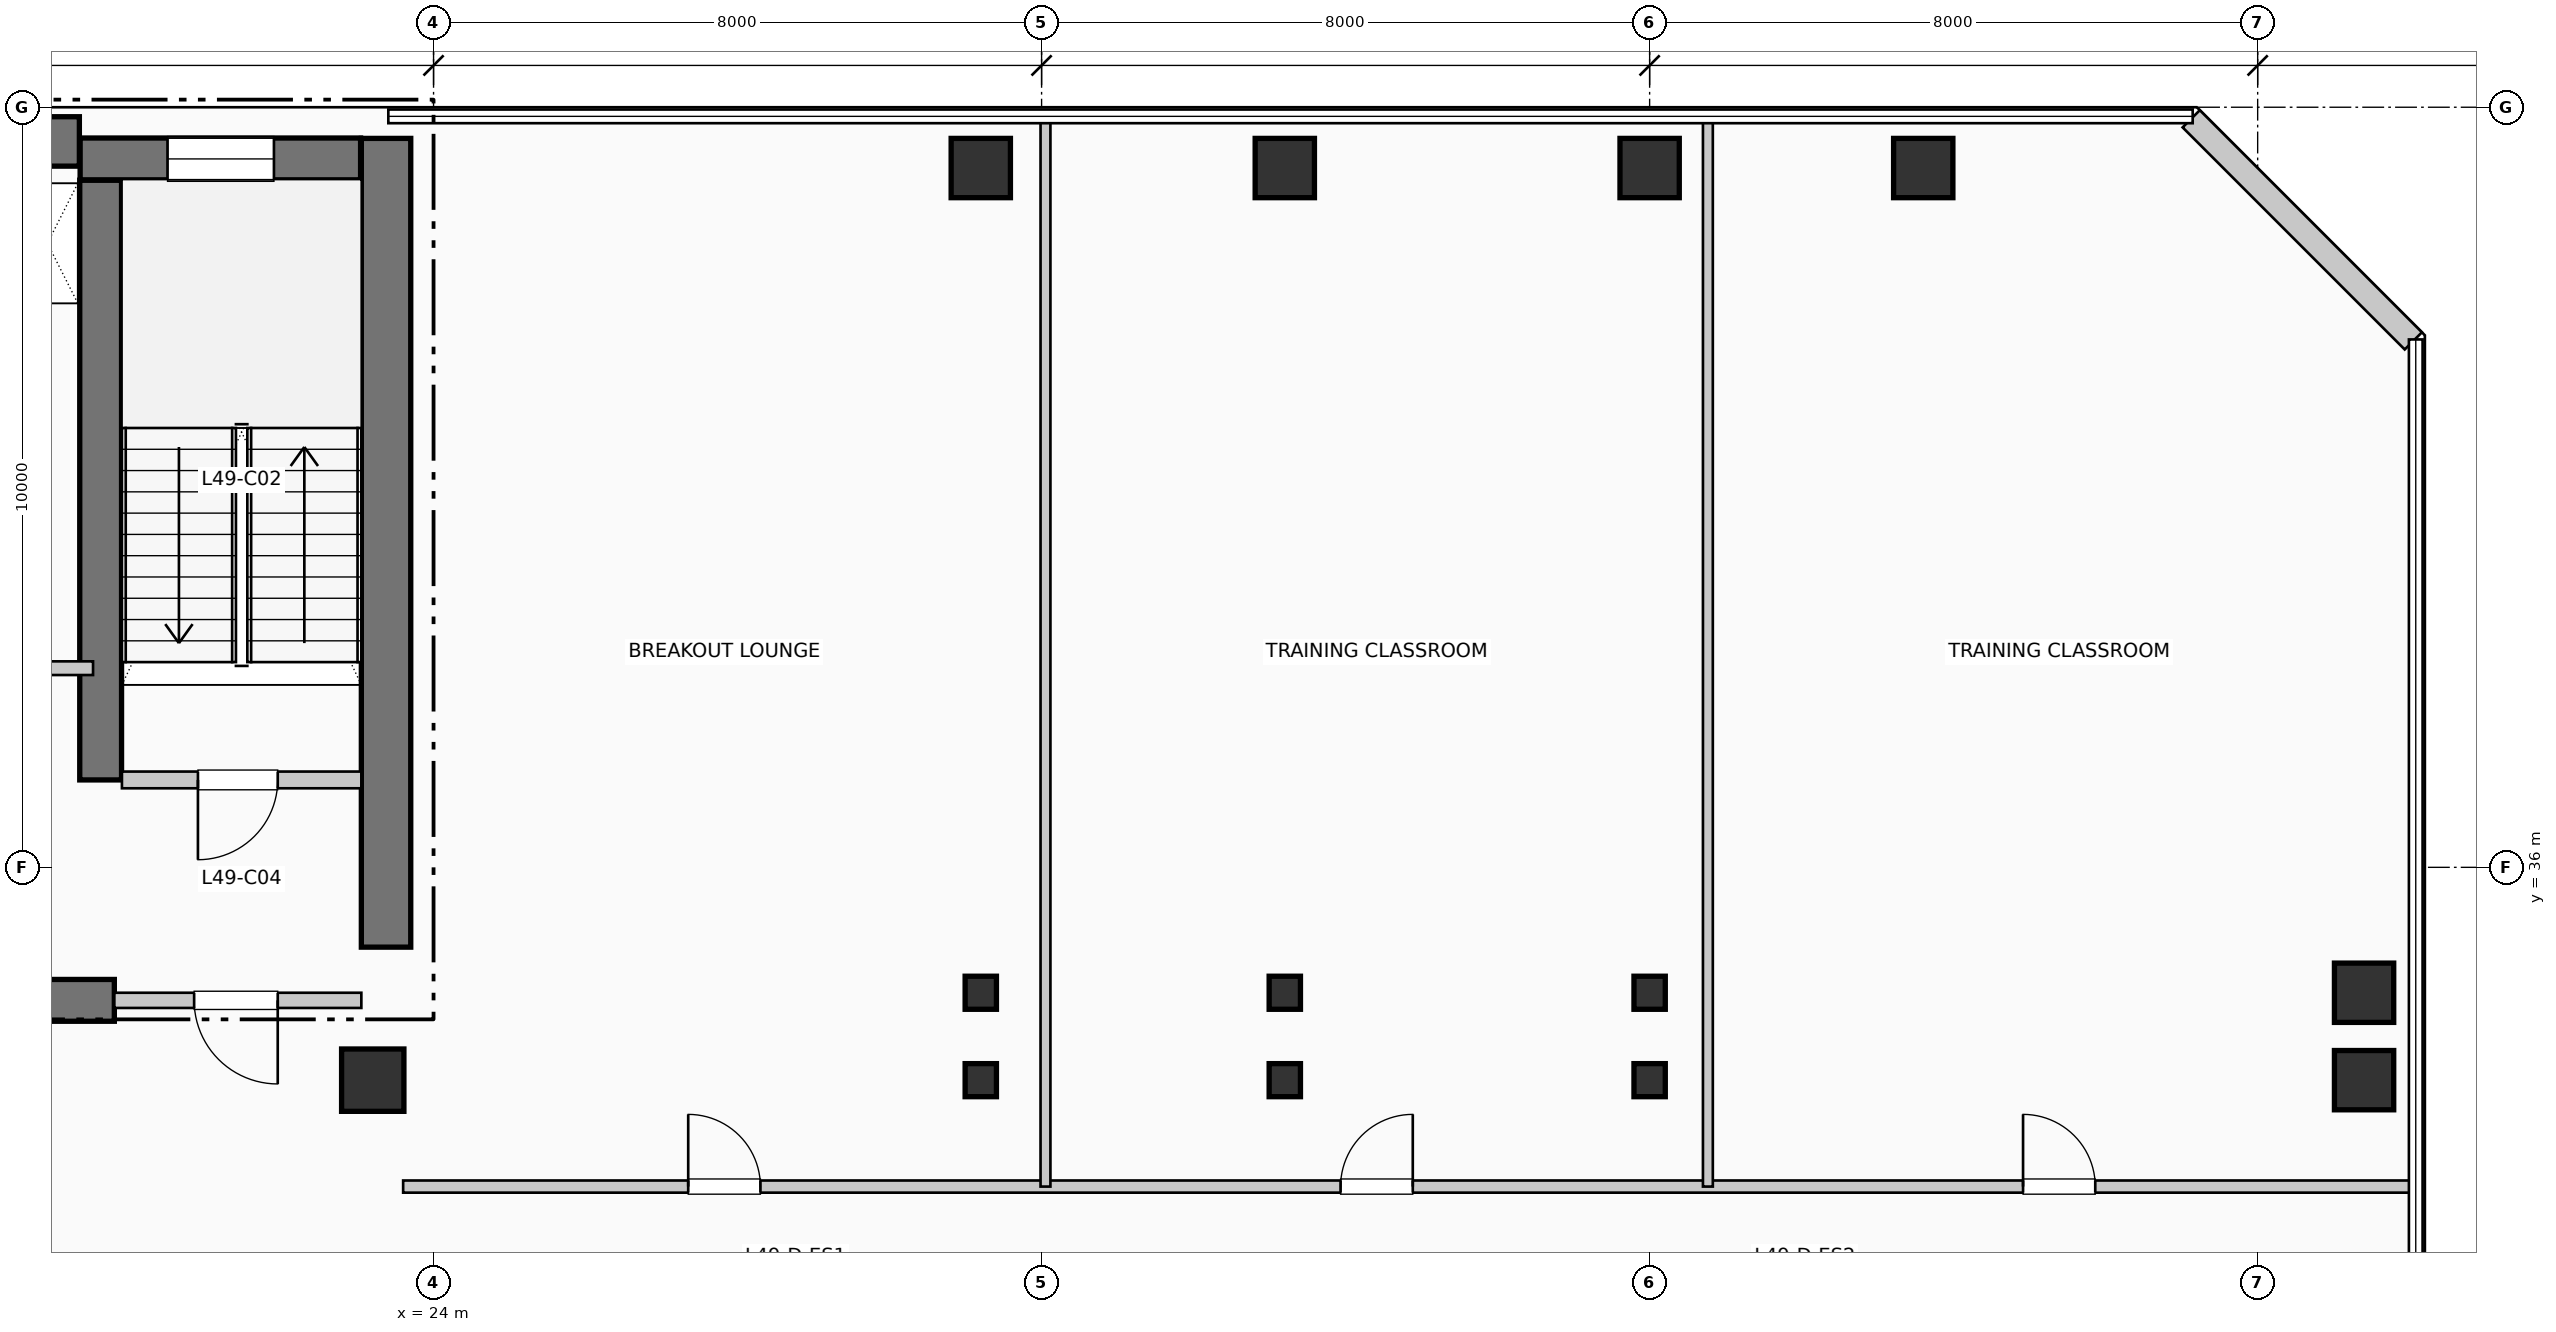
"""IFC4 building model, lengths in metres.
Left out: names, types, materials, properties, quantities, classifications, styles, units other than length and angle.
Written with IfcOpenShell. Run it as: python <this file> out.ifc"""

import sys

from ifc_helpers import new_model, si_unit, direction, frame, frame_2d, origin, origin_2d, place, context, subcontext, project, spatial, rectangle, i_section, extrude, element, fill, save


model = new_model("IFC4")
c1 = context("Model", 3, precision=1e-05, world=origin(), true_north=direction((0.0, 1.0)))
c2 = subcontext(c1, "Body", "Model", "MODEL_VIEW")
j1 = project(units=[si_unit("LENGTHUNIT", "METRE"), si_unit("PLANEANGLEUNIT", "RADIAN")], contexts=[c1])
p1 = place(None, origin())
s1 = spatial("IfcSite", under=j1, at=p1, CompositionType="ELEMENT")
p2 = place(p1, origin())
s2 = spatial("IfcBuilding", under=s1, at=p2, CompositionType="ELEMENT")
p3 = place(p2, frame((0.0, 0.0, 203.28)))
s3 = spatial("IfcBuildingStorey", under=s2, at=p3, CompositionType="ELEMENT", Elevation=203.28)
p4 = place(p3, frame((5.36, 45.55, 0.0), z_axis=(0.0, 0.0, 1.0), x_axis=(1.0, 0.0, 0.0)))
e1 = element("IfcWall", 1, at=p4, inside=s3, PredefinedType="SHEAR", context=c2, shape_type="SweptSolid", body=[
    extrude(rectangle(XDim=13.98, YDim=0.65, at=frame_2d((6.99, 0.0))), origin(), (0.0, 0.0, 1.0), 3.96),
])
p5 = place(p3, frame((23.375, 34.95, 0.0), z_axis=(0.0, 0.0, 1.0), x_axis=(0.0, 1.0, 0.0)))
e2 = element("IfcWall", 2, at=p5, inside=s3, PredefinedType="SHEAR", context=c2, shape_type="SweptSolid", body=[
    extrude(rectangle(XDim=10.64, YDim=0.65, at=frame_2d((5.32, 0.0))), origin(), (0.0, 0.0, 1.0), 3.96),
])
p6 = place(p3, frame((13.68, 34.25, 0.0), z_axis=(0.0, 0.0, 1.0), x_axis=(1.0, 0.0, 0.0)))
e3 = element("IfcWall", 3, at=p6, inside=s3, PredefinedType="SHEAR", context=c2, shape_type="SweptSolid", body=[
    extrude(rectangle(XDim=6.12, YDim=0.55, at=frame_2d((3.06, 0.0))), origin(), (0.0, 0.0, 1.0), 3.96),
])
p7 = place(p3, frame((19.62, 37.15, 0.0), z_axis=(0.0, 0.0, 1.0), x_axis=(0.0, 1.0, 0.0)))
e4 = element("IfcWall", 4, at=p7, inside=s3, PredefinedType="SHEAR", context=c2, shape_type="SweptSolid", body=[
    extrude(rectangle(XDim=7.89, YDim=0.55, at=frame_2d((3.945, 0.0))), origin(), (0.0, 0.0, 1.0), 3.96),
])
p8 = place(p3, frame((19.35, 45.32, 0.0), z_axis=(0.0, 0.0, 1.0), x_axis=(1.0, 0.0, 0.0)))
e5 = element("IfcWall", 5, at=p8, inside=s3, PredefinedType="SHEAR", context=c2, shape_type="SweptSolid", body=[
    extrude(rectangle(XDim=3.69, YDim=0.55, at=frame_2d((1.845, 0.0))), origin(), (0.0, 0.0, 1.0), 3.96),
])
p9 = place(p8, frame((1.15, 0.0, 1.05)))
e6 = element("IfcOpeningElement", 6, at=p9, cuts=e5, PredefinedType="OPENING", context=c2, shape_type="SweptSolid", body=[
    extrude(rectangle(XDim=1.4, YDim=1.8, at=frame_2d((0.7, 0.9))), frame((0.0, 0.285, 0.0), z_axis=(0.0, -1.0, 0.0), x_axis=(1.0, 0.0, 0.0)), (0.0, 0.0, 1.0), 0.57),
])
p10 = place(p3, frame((23.2, 33.2, 0.0), z_axis=(0.0, 0.0, 1.0), x_axis=(1.0, 0.0, 0.0)))
e7 = element("IfcColumn", 7, at=p10, inside=s3, PredefinedType="COLUMN", context=c2, shape_type="SweptSolid", body=[
    extrude(rectangle(XDim=0.82, YDim=0.82, at=origin_2d()), origin(), (0.0, 0.0, 1.0), 3.96),
])
for number, where, z_axis, x_axis in (
    (8, (31.2, 33.2, 0.0), (0.0, 0.0, 1.0), (1.0, 0.0, 0.0)),
    (9, (31.2, 34.35, 0.0), (0.0, 0.0, 1.0), (1.0, 0.0, 0.0)),
):
    element("IfcColumn", number, at=place(p3, frame(where, z_axis=z_axis, x_axis=x_axis)), inside=s3, PredefinedType="COLUMN", context=c2, shape_type="SweptSolid", body=[
        extrude(i_section(OverallWidth=0.412, OverallDepth=0.435, WebThickness=0.027, FlangeThickness=0.043, at=origin_2d()), origin(), (0.0, 0.0, 1.0), 3.96),
    ])
p11 = place(p3, frame((31.2, 45.2, 0.0), z_axis=(0.0, 0.0, 1.0), x_axis=(1.0, 0.0, 0.0)))
e10 = element("IfcColumn", 10, at=p11, inside=s3, PredefinedType="COLUMN", context=c2, shape_type="SweptSolid", body=[
    extrude(rectangle(XDim=0.78, YDim=0.78, at=origin_2d()), origin(), (0.0, 0.0, 1.0), 3.96),
])
for number, where, z_axis, x_axis in (
    (11, (35.2, 33.2, 0.0), (0.0, 0.0, 1.0), (1.0, 0.0, 0.0)),
    (12, (35.2, 34.35, 0.0), (0.0, 0.0, 1.0), (1.0, 0.0, 0.0)),
):
    element("IfcColumn", number, at=place(p3, frame(where, z_axis=z_axis, x_axis=x_axis)), inside=s3, PredefinedType="COLUMN", context=c2, shape_type="SweptSolid", body=[
        extrude(i_section(OverallWidth=0.412, OverallDepth=0.435, WebThickness=0.027, FlangeThickness=0.043, at=origin_2d()), origin(), (0.0, 0.0, 1.0), 3.96),
    ])
p12 = place(p3, frame((35.2, 45.2, 0.0), z_axis=(0.0, 0.0, 1.0), x_axis=(1.0, 0.0, 0.0)))
e13 = element("IfcColumn", 13, at=p12, inside=s3, PredefinedType="COLUMN", context=c2, shape_type="SweptSolid", body=[
    extrude(rectangle(XDim=0.78, YDim=0.78, at=origin_2d()), origin(), (0.0, 0.0, 1.0), 3.96),
])
for number, where, z_axis, x_axis in (
    (14, (40.0, 33.2, 0.0), (0.0, 0.0, 1.0), (1.0, 0.0, 0.0)),
    (15, (40.0, 34.35, 0.0), (0.0, 0.0, 1.0), (1.0, 0.0, 0.0)),
):
    element("IfcColumn", number, at=place(p3, frame(where, z_axis=z_axis, x_axis=x_axis)), inside=s3, PredefinedType="COLUMN", context=c2, shape_type="SweptSolid", body=[
        extrude(i_section(OverallWidth=0.412, OverallDepth=0.435, WebThickness=0.027, FlangeThickness=0.043, at=origin_2d()), origin(), (0.0, 0.0, 1.0), 3.96),
    ])
for number, where, z_axis, x_axis in (
    (16, (40.0, 45.2, 0.0), (0.0, 0.0, 1.0), (1.0, 0.0, 0.0)),
    (17, (43.6, 45.2, 0.0), (0.0, 0.0, 1.0), (1.0, 0.0, 0.0)),
    (18, (49.4, 33.2, 0.0), (0.0, 0.0, 1.0), (1.0, 0.0, 0.0)),
    (19, (49.4, 34.35, 0.0), (0.0, 0.0, 1.0), (1.0, 0.0, 0.0)),
):
    element("IfcColumn", number, at=place(p3, frame(where, z_axis=z_axis, x_axis=x_axis)), inside=s3, PredefinedType="COLUMN", context=c2, shape_type="SweptSolid", body=[
        extrude(rectangle(XDim=0.78, YDim=0.78, at=origin_2d()), origin(), (0.0, 0.0, 1.0), 3.96),
    ])
p13 = place(p3, frame((50.048, 42.926, 0.0), z_axis=(0.0, 0.0, 1.0), x_axis=(-0.707136318428, 0.707077242712, 0.0)))
e20 = element("IfcWall", 20, at=p13, inside=s3, PredefinedType="SOLIDWALL", context=c2, shape_type="SweptSolid", body=[
    extrude(rectangle(XDim=4.133, YDim=0.32, at=frame_2d((2.066, 0.0))), origin(), (0.0, 0.0, 1.0), 3.71),
])
p14 = place(p3, frame((19.9, 37.15, 0.0), z_axis=(0.0, 0.0, 1.0), x_axis=(1.0, 0.0, 0.0)))
e21 = element("IfcWall", 21, at=p14, inside=s3, PredefinedType="PARTITIONING", context=c2, shape_type="SweptSolid", body=[
    extrude(rectangle(XDim=3.15, YDim=0.22, at=frame_2d((1.575, 0.0))), origin(), (0.0, 0.0, 1.0), 3.71),
])
p15 = place(p14, frame((2.05, 0.0, 0.0), z_axis=(0.0, 0.0, 1.0), x_axis=(-1.0, 0.0, 0.0)))
e22 = element("IfcOpeningElement", 22, at=p15, cuts=e21, PredefinedType="OPENING", context=c2, shape_type="SweptSolid", body=[
    extrude(rectangle(XDim=1.05, YDim=2.15, at=frame_2d((0.525, 1.075))), frame((0.0, 0.12, 0.0), z_axis=(0.0, -1.0, 0.0), x_axis=(1.0, 0.0, 0.0)), (0.0, 0.0, 1.0), 0.24),
])
p16 = place(p3, frame((19.8, 34.25, 0.0), z_axis=(0.0, 0.0, 1.0), x_axis=(1.0, 0.0, 0.0)))
e23 = element("IfcWall", 23, at=p16, inside=s3, PredefinedType="PARTITIONING", context=c2, shape_type="SweptSolid", body=[
    extrude(rectangle(XDim=3.25, YDim=0.2, at=frame_2d((1.625, 0.0))), origin(), (0.0, 0.0, 1.0), 3.71),
])
p17 = place(p16, frame((2.15, 0.0, 0.0), z_axis=(0.0, 0.0, 1.0), x_axis=(-1.0, 0.0, 0.0)))
e24 = element("IfcOpeningElement", 24, at=p17, cuts=e23, PredefinedType="OPENING", context=c2, shape_type="SweptSolid", body=[
    extrude(rectangle(XDim=1.1, YDim=2.15, at=frame_2d((0.55, 1.075))), frame((0.0, 0.11, 0.0), z_axis=(0.0, -1.0, 0.0), x_axis=(1.0, 0.0, 0.0)), (0.0, 0.0, 1.0), 0.22),
])
p18 = place(p3, frame((17.68, 38.62, 0.0), z_axis=(0.0, 0.0, 1.0), x_axis=(1.0, 0.0, 0.0)))
e25 = element("IfcWall", 25, at=p18, inside=s3, PredefinedType="PARTITIONING", context=c2, shape_type="SweptSolid", body=[
    extrude(rectangle(XDim=1.84, YDim=0.18, at=frame_2d((0.92, 0.0))), origin(), (0.0, 0.0, 1.0), 3.71),
])
p19 = place(p18, frame((0.24, 0.0, 0.0)))
e26 = element("IfcOpeningElement", 26, at=p19, cuts=e25, PredefinedType="OPENING", context=c2, shape_type="SweptSolid", body=[
    extrude(rectangle(XDim=0.92, YDim=2.1, at=frame_2d((0.46, 1.05))), frame((0.0, 0.1, 0.0), z_axis=(0.0, -1.0, 0.0), x_axis=(1.0, 0.0, 0.0)), (0.0, 0.0, 1.0), 0.2),
])
p20 = place(p3, frame((23.6, 31.8, 0.0), z_axis=(0.0, 0.0, 1.0), x_axis=(1.0, 0.0, 0.0)))
e27 = element("IfcWall", 27, at=p20, inside=s3, PredefinedType="PARTITIONING", context=c2, shape_type="SweptSolid", body=[
    extrude(rectangle(XDim=26.41, YDim=0.16, at=frame_2d((13.205, 0.0))), origin(), (0.0, 0.0, 1.0), 3.71),
])
p21 = place(p20, frame((3.75, 0.0, 0.0)))
e28 = element("IfcOpeningElement", 28, at=p21, cuts=e27, PredefinedType="OPENING", context=c2, shape_type="SweptSolid", body=[
    extrude(rectangle(XDim=0.95, YDim=2.15, at=frame_2d((0.475, 1.075))), frame((0.0, 0.09, 0.0), z_axis=(0.0, -1.0, 0.0), x_axis=(1.0, 0.0, 0.0)), (0.0, 0.0, 1.0), 0.18),
])
p22 = place(p20, frame((12.334, 0.0, 0.0)))
e29 = element("IfcOpeningElement", 29, at=p22, cuts=e27, PredefinedType="OPENING", context=c2, shape_type="SweptSolid", body=[
    extrude(rectangle(XDim=0.95, YDim=2.15, at=frame_2d((0.475, 1.075))), frame((0.0, 0.09, 0.0), z_axis=(0.0, -1.0, 0.0), x_axis=(1.0, 0.0, 0.0)), (0.0, 0.0, 1.0), 0.18),
])
p23 = place(p20, frame((21.313, 0.0, 0.0)))
e30 = element("IfcOpeningElement", 30, at=p23, cuts=e27, PredefinedType="OPENING", context=c2, shape_type="SweptSolid", body=[
    extrude(rectangle(XDim=0.95, YDim=2.15, at=frame_2d((0.475, 1.075))), frame((0.0, 0.09, 0.0), z_axis=(0.0, -1.0, 0.0), x_axis=(1.0, 0.0, 0.0)), (0.0, 0.0, 1.0), 0.18),
])
for number, where, z_axis, x_axis in (
    (31, (32.051, 31.8, 0.0), (0.0, 0.0, 1.0), (0.0, 1.0, 0.0)),
    (32, (40.767, 31.8, 0.0), (0.0, 0.0, 1.0), (0.0, 1.0, 0.0)),
):
    element("IfcWall", number, at=place(p3, frame(where, z_axis=z_axis, x_axis=x_axis)), inside=s3, PredefinedType="PARTITIONING", context=c2, shape_type="SweptSolid", body=[
        extrude(rectangle(XDim=14.01, YDim=0.13, at=frame_2d((7.005, 0.0))), origin(), (0.0, 0.0, 1.0), 3.71),
    ])
p24 = place(p9, origin())
e33 = element("IfcWindow", 33, at=p24, inside=s3, PartitioningType="SINGLE_PANEL", PredefinedType="WINDOW", context=c2, shape_type="SweptSolid", body=[
    extrude(rectangle(XDim=1.4, YDim=1.8, at=frame_2d((0.7, 0.9))), frame((0.0, 0.03, 0.0), z_axis=(0.0, -1.0, 0.0), x_axis=(1.0, 0.0, 0.0)), (0.0, 0.0, 1.0), 0.06),
])
fill(e6, e33)
p25 = place(p15, origin())
e34 = element("IfcDoor", 34, at=p25, inside=s3, OperationType="SINGLE_SWING_LEFT", PredefinedType="DOOR", context=c2, shape_type="SweptSolid", body=[
    extrude(rectangle(XDim=1.05, YDim=2.15, at=frame_2d((0.525, 1.075))), frame((0.0, 0.025, 0.0), z_axis=(0.0, -1.0, 0.0), x_axis=(1.0, 0.0, 0.0)), (0.0, 0.0, 1.0), 0.05),
])
fill(e22, e34)
p26 = place(p17, origin())
e35 = element("IfcDoor", 35, at=p26, inside=s3, OperationType="SINGLE_SWING_RIGHT", PredefinedType="DOOR", context=c2, shape_type="SweptSolid", body=[
    extrude(rectangle(XDim=1.1, YDim=2.15, at=frame_2d((0.55, 1.075))), frame((0.0, 0.025, 0.0), z_axis=(0.0, -1.0, 0.0), x_axis=(1.0, 0.0, 0.0)), (0.0, 0.0, 1.0), 0.05),
])
fill(e24, e35)
p27 = place(p21, origin())
e36 = element("IfcDoor", 36, at=p27, inside=s3, OperationType="SINGLE_SWING_LEFT", PredefinedType="DOOR", context=c2, shape_type="SweptSolid", body=[
    extrude(rectangle(XDim=0.95, YDim=2.15, at=frame_2d((0.475, 1.075))), frame((0.0, 0.025, 0.0), z_axis=(0.0, -1.0, 0.0), x_axis=(1.0, 0.0, 0.0)), (0.0, 0.0, 1.0), 0.05),
])
fill(e28, e36)
p28 = place(p22, origin())
e37 = element("IfcDoor", 37, at=p28, inside=s3, OperationType="SINGLE_SWING_RIGHT", PredefinedType="DOOR", context=c2, shape_type="SweptSolid", body=[
    extrude(rectangle(XDim=0.95, YDim=2.15, at=frame_2d((0.475, 1.075))), frame((0.0, 0.025, 0.0), z_axis=(0.0, -1.0, 0.0), x_axis=(1.0, 0.0, 0.0)), (0.0, 0.0, 1.0), 0.05),
])
fill(e29, e37)
p29 = place(p23, origin())
e38 = element("IfcDoor", 38, at=p29, inside=s3, OperationType="SINGLE_SWING_LEFT", PredefinedType="DOOR", context=c2, shape_type="SweptSolid", body=[
    extrude(rectangle(XDim=0.95, YDim=2.15, at=frame_2d((0.475, 1.075))), frame((0.0, 0.025, 0.0), z_axis=(0.0, -1.0, 0.0), x_axis=(1.0, 0.0, 0.0)), (0.0, 0.0, 1.0), 0.05),
])
fill(e30, e38)
save(model, sys.argv[1])
